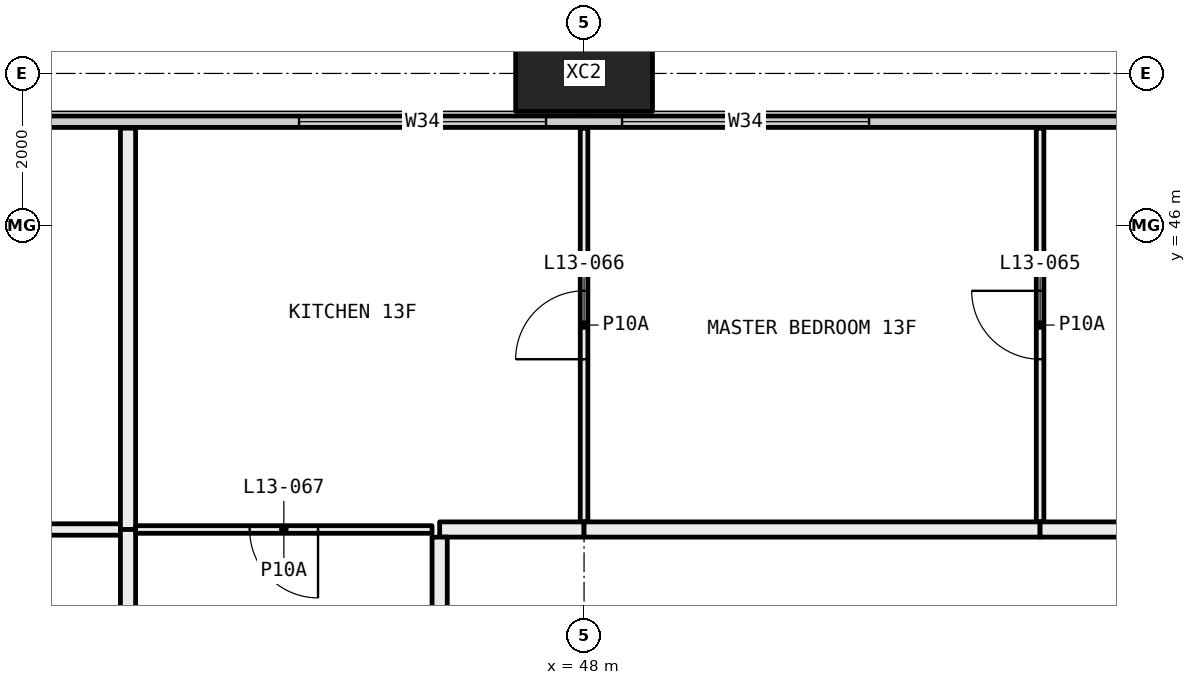
"""IFC4 building model, lengths in metres.
Left out: names, types, materials, properties, quantities, classifications, styles, units other than length and angle.
Written with IfcOpenShell. Run it as: python <this file> out.ifc"""

import sys

from ifc_helpers import new_model, si_unit, direction, frame, frame_2d, origin, origin_2d, place, context, subcontext, project, spatial, rectangle, hollow_rectangle, extrude, element, fill, save


model = new_model("IFC4")
c1 = context("Model", 3, precision=1e-05, world=origin(), true_north=direction((0.0, 1.0)))
c2 = subcontext(c1, "Body", "Model", "MODEL_VIEW")
j1 = project(units=[si_unit("LENGTHUNIT", "METRE"), si_unit("PLANEANGLEUNIT", "RADIAN")], contexts=[c1])
p1 = place(None, origin())
s1 = spatial("IfcSite", under=j1, at=p1, CompositionType="ELEMENT")
p2 = place(p1, origin())
s2 = spatial("IfcBuilding", under=s1, at=p2, CompositionType="ELEMENT")
p3 = place(p2, frame((0.0, 0.0, 57.6)))
s3 = spatial("IfcBuildingStorey", under=s2, at=p3, CompositionType="ELEMENT", Elevation=57.6)
p4 = place(p3, frame((48.0, 48.0, -0.4), z_axis=(0.0, 0.0, 1.0), x_axis=(1.0, 0.0, 0.0)))
e1 = element("IfcColumn", 1, at=p4, inside=s3, PredefinedType="COLUMN", context=c2, shape_type="SweptSolid", body=[
    extrude(hollow_rectangle(XDim=1.8, YDim=1.0, WallThickness=0.07, at=origin_2d()), origin(), (0.0, 0.0, 1.0), 3.45),
])
p5 = place(p3, frame((6.56, 47.365, 0.0), z_axis=(0.0, 0.0, 1.0), x_axis=(1.0, 0.0, 0.0)))
e2 = element("IfcWall", 2, at=p5, inside=s3, PredefinedType="ELEMENTEDWALL", context=c2, shape_type="SweptSolid", body=[
    extrude(rectangle(XDim=58.88, YDim=0.15, at=frame_2d((29.44, 0.0))), origin(), (0.0, 0.0, 1.0), 3.05),
])
p6 = place(p5, frame((0.44, 0.0, 0.45)))
e3 = element("IfcOpeningElement", 3, at=p6, cuts=e2, PredefinedType="OPENING", context=c2, shape_type="SweptSolid", body=[
    extrude(rectangle(XDim=4.5, YDim=2.55, at=frame_2d((2.25, 1.275))), frame((0.0, 0.085, 0.0), z_axis=(0.0, -1.0, 0.0), x_axis=(1.0, 0.0, 0.0)), (0.0, 0.0, 1.0), 0.17),
])
p7 = place(p5, frame((5.94, 0.0, 0.45)))
e4 = element("IfcOpeningElement", 4, at=p7, cuts=e2, PredefinedType="OPENING", context=c2, shape_type="SweptSolid", body=[
    extrude(rectangle(XDim=3.25, YDim=2.55, at=frame_2d((1.625, 1.275))), frame((0.0, 0.085, 0.0), z_axis=(0.0, -1.0, 0.0), x_axis=(1.0, 0.0, 0.0)), (0.0, 0.0, 1.0), 0.17),
])
p8 = place(p5, frame((13.69, 0.0, 0.45)))
e5 = element("IfcOpeningElement", 5, at=p8, cuts=e2, PredefinedType="OPENING", context=c2, shape_type="SweptSolid", body=[
    extrude(rectangle(XDim=3.25, YDim=2.55, at=frame_2d((1.625, 1.275))), frame((0.0, 0.085, 0.0), z_axis=(0.0, -1.0, 0.0), x_axis=(1.0, 0.0, 0.0)), (0.0, 0.0, 1.0), 0.17),
])
p9 = place(p5, frame((17.94, 0.0, 0.45)))
e6 = element("IfcOpeningElement", 6, at=p9, cuts=e2, PredefinedType="OPENING", context=c2, shape_type="SweptSolid", body=[
    extrude(rectangle(XDim=3.25, YDim=2.55, at=frame_2d((1.625, 1.275))), frame((0.0, 0.085, 0.0), z_axis=(0.0, -1.0, 0.0), x_axis=(1.0, 0.0, 0.0)), (0.0, 0.0, 1.0), 0.17),
])
p10 = place(p5, frame((26.94, 0.0, 0.45)))
e7 = element("IfcOpeningElement", 7, at=p10, cuts=e2, PredefinedType="OPENING", context=c2, shape_type="SweptSolid", body=[
    extrude(rectangle(XDim=2.0, YDim=2.55, at=frame_2d((1.0, 1.275))), frame((0.0, 0.085, 0.0), z_axis=(0.0, -1.0, 0.0), x_axis=(1.0, 0.0, 0.0)), (0.0, 0.0, 1.0), 0.17),
])
p11 = place(p5, frame((29.94, 0.0, 0.45)))
e8 = element("IfcOpeningElement", 8, at=p11, cuts=e2, PredefinedType="OPENING", context=c2, shape_type="SweptSolid", body=[
    extrude(rectangle(XDim=3.25, YDim=2.55, at=frame_2d((1.625, 1.275))), frame((0.0, 0.085, 0.0), z_axis=(0.0, -1.0, 0.0), x_axis=(1.0, 0.0, 0.0)), (0.0, 0.0, 1.0), 0.17),
])
p12 = place(p5, frame((37.69, 0.0, 0.45)))
e9 = element("IfcOpeningElement", 9, at=p12, cuts=e2, PredefinedType="OPENING", context=c2, shape_type="SweptSolid", body=[
    extrude(rectangle(XDim=3.25, YDim=2.55, at=frame_2d((1.625, 1.275))), frame((0.0, 0.085, 0.0), z_axis=(0.0, -1.0, 0.0), x_axis=(1.0, 0.0, 0.0)), (0.0, 0.0, 1.0), 0.17),
])
p13 = place(p5, frame((41.94, 0.0, 0.45)))
e10 = element("IfcOpeningElement", 10, at=p13, cuts=e2, PredefinedType="OPENING", context=c2, shape_type="SweptSolid", body=[
    extrude(rectangle(XDim=3.25, YDim=2.55, at=frame_2d((1.625, 1.275))), frame((0.0, 0.085, 0.0), z_axis=(0.0, -1.0, 0.0), x_axis=(1.0, 0.0, 0.0)), (0.0, 0.0, 1.0), 0.17),
])
p14 = place(p5, frame((50.94, 0.0, 0.45)))
e11 = element("IfcOpeningElement", 11, at=p14, cuts=e2, PredefinedType="OPENING", context=c2, shape_type="SweptSolid", body=[
    extrude(rectangle(XDim=2.0, YDim=2.55, at=frame_2d((1.0, 1.275))), frame((0.0, 0.085, 0.0), z_axis=(0.0, -1.0, 0.0), x_axis=(1.0, 0.0, 0.0)), (0.0, 0.0, 1.0), 0.17),
])
p15 = place(p5, frame((53.94, 0.0, 0.45)))
e12 = element("IfcOpeningElement", 12, at=p15, cuts=e2, PredefinedType="OPENING", context=c2, shape_type="SweptSolid", body=[
    extrude(rectangle(XDim=4.5, YDim=2.55, at=frame_2d((2.25, 1.275))), frame((0.0, 0.085, 0.0), z_axis=(0.0, -1.0, 0.0), x_axis=(1.0, 0.0, 0.0)), (0.0, 0.0, 1.0), 0.17),
])
p16 = place(p3, frame((36.0, 42.0, 0.0), z_axis=(0.0, 0.0, 1.0), x_axis=(1.0, 0.0, 0.0)))
e13 = element("IfcWall", 13, at=p16, inside=s3, PredefinedType="PARTITIONING", context=c2, shape_type="SweptSolid", body=[
    extrude(rectangle(XDim=5.9, YDim=0.15, at=frame_2d((2.95, 0.0))), origin(), (0.0, 0.0, 1.0), 2.45),
])
p17 = place(p16, frame((2.5, 0.0, 0.0)))
e14 = element("IfcOpeningElement", 14, at=p17, cuts=e13, PredefinedType="OPENING", context=c2, shape_type="SweptSolid", body=[
    extrude(rectangle(XDim=0.9, YDim=2.1, at=frame_2d((0.45, 1.05))), frame((0.0, 0.085, 0.0), z_axis=(0.0, -1.0, 0.0), x_axis=(1.0, 0.0, 0.0)), (0.0, 0.0, 1.0), 0.17),
])
p18 = place(p3, frame((42.0, 42.0, 0.0), z_axis=(0.0, 0.0, 1.0), x_axis=(0.0, 1.0, 0.0)))
e15 = element("IfcWall", 15, at=p18, inside=s3, PredefinedType="PARTITIONING", context=c2, shape_type="SweptSolid", body=[
    extrude(rectangle(XDim=5.28, YDim=0.2, at=frame_2d((2.64, 0.0))), origin(), (0.0, 0.0, 1.0), 3.05),
])
p19 = place(p3, frame((42.0, 38.1, 0.0), z_axis=(0.0, 0.0, 1.0), x_axis=(0.0, 1.0, 0.0)))
e16 = element("IfcWall", 16, at=p19, inside=s3, PredefinedType="PARTITIONING", context=c2, shape_type="SweptSolid", body=[
    extrude(rectangle(XDim=3.9, YDim=0.2, at=frame_2d((1.95, 0.0))), origin(), (0.0, 0.0, 1.0), 3.05),
])
p20 = place(p3, frame((48.0, 42.1, 0.0), z_axis=(0.0, 0.0, 1.0), x_axis=(0.0, 1.0, 0.0)))
e17 = element("IfcWall", 17, at=p20, inside=s3, PredefinedType="PARTITIONING", context=c2, shape_type="SweptSolid", body=[
    extrude(rectangle(XDim=5.18, YDim=0.1, at=frame_2d((2.59, 0.0))), origin(), (0.0, 0.0, 1.0), 3.05),
])
p21 = place(p20, frame((2.14, 0.0, 0.0)))
e18 = element("IfcOpeningElement", 18, at=p21, cuts=e17, PredefinedType="OPENING", context=c2, shape_type="SweptSolid", body=[
    extrude(rectangle(XDim=0.9, YDim=2.1, at=frame_2d((0.45, 1.05))), frame((0.0, 0.06, 0.0), z_axis=(0.0, -1.0, 0.0), x_axis=(1.0, 0.0, 0.0)), (0.0, 0.0, 1.0), 0.12),
])
p22 = place(p3, frame((42.1, 42.0, 0.0), z_axis=(0.0, 0.0, 1.0), x_axis=(1.0, 0.0, 0.0)))
e19 = element("IfcWall", 19, at=p22, inside=s3, PredefinedType="PARTITIONING", context=c2, shape_type="SweptSolid", body=[
    extrude(rectangle(XDim=3.9, YDim=0.1, at=frame_2d((1.95, 0.0))), origin(), (0.0, 0.0, 1.0), 3.05),
])
p23 = place(p22, frame((1.5, 0.0, 0.0)))
e20 = element("IfcOpeningElement", 20, at=p23, cuts=e19, PredefinedType="OPENING", context=c2, shape_type="SweptSolid", body=[
    extrude(rectangle(XDim=0.9, YDim=2.1, at=frame_2d((0.45, 1.05))), frame((0.0, 0.06, 0.0), z_axis=(0.0, -1.0, 0.0), x_axis=(1.0, 0.0, 0.0)), (0.0, 0.0, 1.0), 0.12),
])
p24 = place(p3, frame((46.1, 42.0, 0.0), z_axis=(0.0, 0.0, 1.0), x_axis=(1.0, 0.0, 0.0)))
e21 = element("IfcWall", 21, at=p24, inside=s3, PredefinedType="PARTITIONING", context=c2, shape_type="SweptSolid", body=[
    extrude(rectangle(XDim=1.9, YDim=0.2, at=frame_2d((0.95, 0.0))), origin(), (0.0, 0.0, 1.0), 3.05),
])
p25 = place(p3, frame((54.0, 42.1, 0.0), z_axis=(0.0, 0.0, 1.0), x_axis=(0.0, 1.0, 0.0)))
e22 = element("IfcWall", 22, at=p25, inside=s3, PredefinedType="PARTITIONING", context=c2, shape_type="SweptSolid", body=[
    extrude(rectangle(XDim=5.18, YDim=0.1, at=frame_2d((2.59, 0.0))), origin(), (0.0, 0.0, 1.0), 3.05),
])
p26 = place(p25, frame((2.14, 0.0, 0.0)))
e23 = element("IfcOpeningElement", 23, at=p26, cuts=e22, PredefinedType="OPENING", context=c2, shape_type="SweptSolid", body=[
    extrude(rectangle(XDim=0.9, YDim=2.1, at=frame_2d((0.45, 1.05))), frame((0.0, 0.06, 0.0), z_axis=(0.0, -1.0, 0.0), x_axis=(1.0, 0.0, 0.0)), (0.0, 0.0, 1.0), 0.12),
])
p27 = place(p3, frame((48.0, 42.0, 0.0), z_axis=(0.0, 0.0, 1.0), x_axis=(1.0, 0.0, 0.0)))
e24 = element("IfcWall", 24, at=p27, inside=s3, PredefinedType="PARTITIONING", context=c2, shape_type="SweptSolid", body=[
    extrude(rectangle(XDim=6.0, YDim=0.2, at=frame_2d((3.0, 0.0))), origin(), (0.0, 0.0, 1.0), 3.05),
])
p28 = place(p3, frame((54.0, 42.0, 0.0), z_axis=(0.0, 0.0, 1.0), x_axis=(1.0, 0.0, 0.0)))
e25 = element("IfcWall", 25, at=p28, inside=s3, PredefinedType="PARTITIONING", context=c2, shape_type="SweptSolid", body=[
    extrude(rectangle(XDim=6.0, YDim=0.2, at=frame_2d((3.0, 0.0))), origin(), (0.0, 0.0, 1.0), 3.05),
])
p29 = place(p28, frame((2.5, 0.0, 0.0)))
e26 = element("IfcOpeningElement", 26, at=p29, cuts=e25, PredefinedType="OPENING", context=c2, shape_type="SweptSolid", body=[
    extrude(rectangle(XDim=1.0, YDim=2.1, at=frame_2d((0.5, 1.05))), frame((0.0, 0.11, 0.0), z_axis=(0.0, -1.0, 0.0), x_axis=(1.0, 0.0, 0.0)), (0.0, 0.0, 1.0), 0.22),
])
p30 = place(p3, frame((46.1, 36.1, 0.0), z_axis=(0.0, 0.0, 1.0), x_axis=(0.0, 1.0, 0.0)))
e27 = element("IfcWall", 27, at=p30, inside=s3, PredefinedType="PARTITIONING", context=c2, shape_type="SweptSolid", body=[
    extrude(rectangle(XDim=5.8, YDim=0.2, at=frame_2d((2.9, 0.0))), origin(), (0.0, 0.0, 1.0), 3.05),
])
p31 = place(p12, origin())
e28 = element("IfcWindow", 28, at=p31, inside=s3, PartitioningType="SINGLE_PANEL", PredefinedType="WINDOW", context=c2, shape_type="SweptSolid", body=[
    extrude(rectangle(XDim=3.25, YDim=2.55, at=frame_2d((1.625, 1.275))), frame((0.0, 0.03, 0.0), z_axis=(0.0, -1.0, 0.0), x_axis=(1.0, 0.0, 0.0)), (0.0, 0.0, 1.0), 0.06),
])
fill(e9, e28)
p32 = place(p13, origin())
e29 = element("IfcWindow", 29, at=p32, inside=s3, PartitioningType="SINGLE_PANEL", PredefinedType="WINDOW", context=c2, shape_type="SweptSolid", body=[
    extrude(rectangle(XDim=3.25, YDim=2.55, at=frame_2d((1.625, 1.275))), frame((0.0, 0.03, 0.0), z_axis=(0.0, -1.0, 0.0), x_axis=(1.0, 0.0, 0.0)), (0.0, 0.0, 1.0), 0.06),
])
fill(e10, e29)
p33 = place(p26, origin())
e30 = element("IfcDoor", 30, at=p33, inside=s3, OperationType="SINGLE_SWING_LEFT", PredefinedType="DOOR", context=c2, shape_type="SweptSolid", body=[
    extrude(rectangle(XDim=0.9, YDim=2.1, at=frame_2d((0.45, 1.05))), frame((0.0, 0.025, 0.0), z_axis=(0.0, -1.0, 0.0), x_axis=(1.0, 0.0, 0.0)), (0.0, 0.0, 1.0), 0.05),
])
fill(e23, e30)
p34 = place(p21, origin())
e31 = element("IfcDoor", 31, at=p34, inside=s3, OperationType="SINGLE_SWING_RIGHT", PredefinedType="DOOR", context=c2, shape_type="SweptSolid", body=[
    extrude(rectangle(XDim=0.9, YDim=2.1, at=frame_2d((0.45, 1.05))), frame((0.0, 0.025, 0.0), z_axis=(0.0, -1.0, 0.0), x_axis=(1.0, 0.0, 0.0)), (0.0, 0.0, 1.0), 0.05),
])
fill(e18, e31)
p35 = place(p23, frame((0.9, 0.0, 0.0), x_axis=(-1.0, 0.0, 0.0)))
e32 = element("IfcDoor", 32, at=p35, inside=s3, OperationType="SINGLE_SWING_RIGHT", PredefinedType="DOOR", context=c2, shape_type="SweptSolid", body=[
    extrude(rectangle(XDim=0.9, YDim=2.1, at=frame_2d((0.45, 1.05))), frame((0.0, 0.025, 0.0), z_axis=(0.0, -1.0, 0.0), x_axis=(1.0, 0.0, 0.0)), (0.0, 0.0, 1.0), 0.05),
])
fill(e20, e32)
save(model, sys.argv[1])
